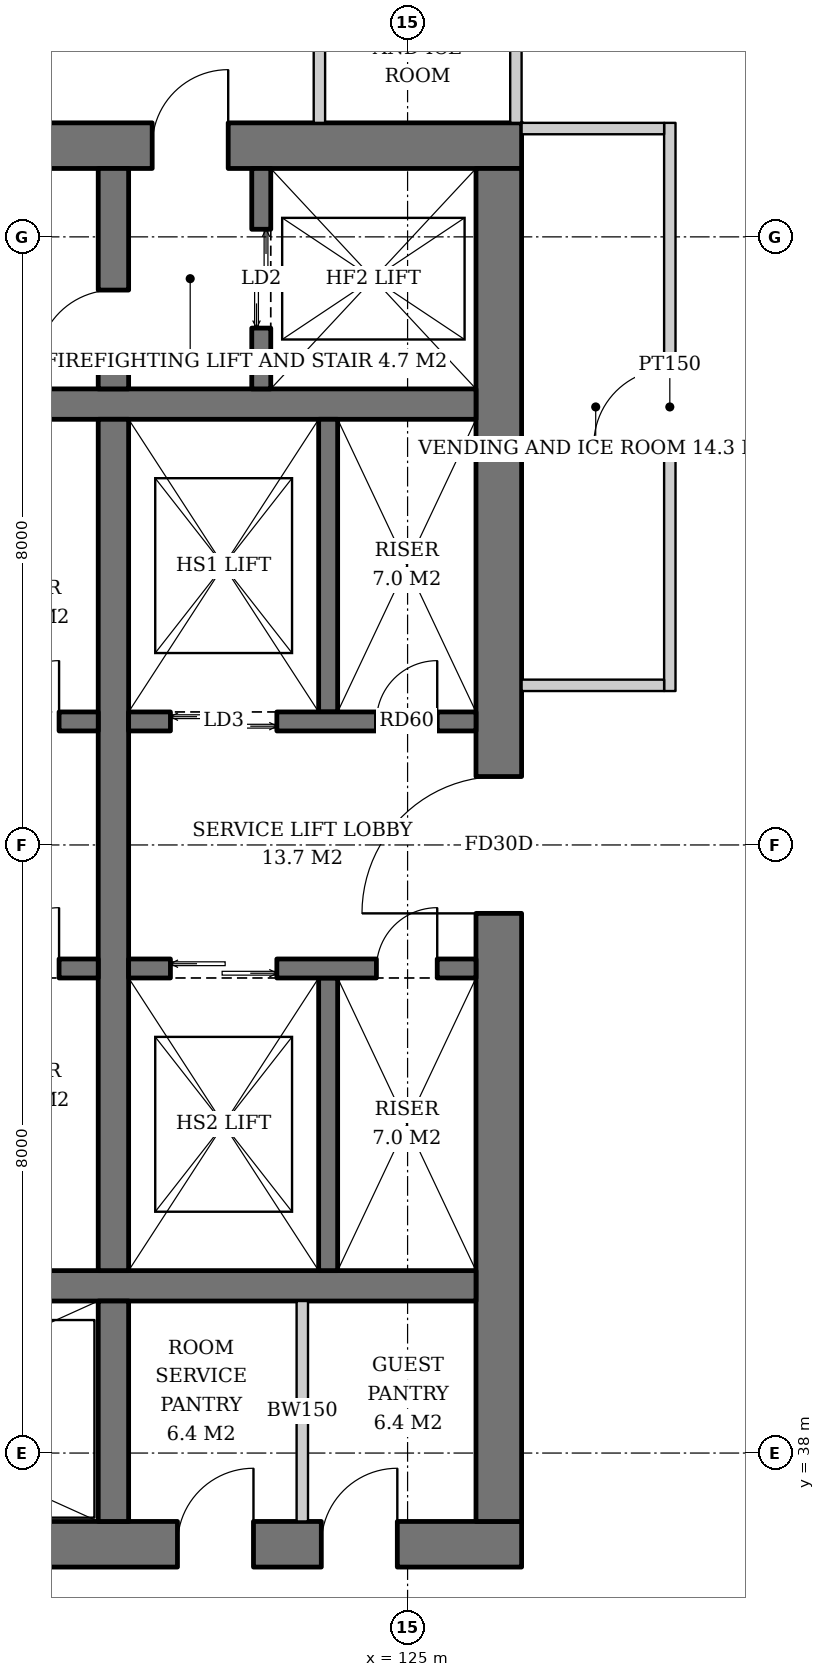
"""IFC4 building model, lengths in metres.
Left out: names, types, materials, properties, quantities, classifications, styles, units other than length and angle.
Written with IfcOpenShell. Run it as: python <this file> out.ifc"""

import sys

from ifc_helpers import new_model, si_unit, direction, frame, frame_2d, origin, place, context, subcontext, project, spatial, rectangle, extrude, element, fill, save


model = new_model("IFC4")
c1 = context("Model", 3, precision=1e-05, world=origin(), true_north=direction((0.0, 1.0)))
c2 = subcontext(c1, "Body", "Model", "MODEL_VIEW")
j1 = project(units=[si_unit("LENGTHUNIT", "METRE"), si_unit("PLANEANGLEUNIT", "RADIAN")], contexts=[c1])
p1 = place(None, origin())
s1 = spatial("IfcSite", under=j1, at=p1, CompositionType="ELEMENT")
p2 = place(p1, origin())
s2 = spatial("IfcBuilding", under=s1, at=p2, CompositionType="ELEMENT")
p3 = place(p2, frame((0.0, 0.0, 28.6)))
s3 = spatial("IfcBuildingStorey", under=s2, at=p3, CompositionType="ELEMENT", Elevation=28.6)
p4 = place(p3, frame((107.5, 36.8, 0.0), z_axis=(0.0, 0.0, 1.0), x_axis=(1.0, 0.0, 0.0)))
e1 = element("IfcWall", 1, at=p4, inside=s3, PredefinedType="SHEAR", context=c2, shape_type="SweptSolid", body=[
    extrude(rectangle(XDim=19.0, YDim=0.6, at=frame_2d((9.5, 0.0))), origin(), (0.0, 0.0, 1.0), 3.8),
])
p5 = place(p4, frame((3.9, 0.0, 0.0)))
e2 = element("IfcOpeningElement", 2, at=p5, cuts=e1, PredefinedType="OPENING", context=c2, shape_type="SweptSolid", body=[
    extrude(rectangle(XDim=1.0, YDim=2.1, at=frame_2d((0.5, 1.05))), frame((0.0, 0.31, 0.0), z_axis=(0.0, -1.0, 0.0), x_axis=(1.0, 0.0, 0.0)), (0.0, 0.0, 1.0), 0.62),
])
p6 = place(p4, frame((14.472, 0.0, 0.0)))
e3 = element("IfcOpeningElement", 3, at=p6, cuts=e1, PredefinedType="OPENING", context=c2, shape_type="SweptSolid", body=[
    extrude(rectangle(XDim=1.0, YDim=2.1, at=frame_2d((0.5, 1.05))), frame((0.0, 0.31, 0.0), z_axis=(0.0, -1.0, 0.0), x_axis=(1.0, 0.0, 0.0)), (0.0, 0.0, 1.0), 0.62),
])
p7 = place(p4, frame((16.365, 0.0, 0.0)))
e4 = element("IfcOpeningElement", 4, at=p7, cuts=e1, PredefinedType="OPENING", context=c2, shape_type="SweptSolid", body=[
    extrude(rectangle(XDim=1.0, YDim=2.1, at=frame_2d((0.5, 1.05))), frame((0.0, 0.31, 0.0), z_axis=(0.0, -1.0, 0.0), x_axis=(1.0, 0.0, 0.0)), (0.0, 0.0, 1.0), 0.62),
])
p8 = place(p3, frame((107.5, 55.2, 0.0), z_axis=(0.0, 0.0, 1.0), x_axis=(1.0, 0.0, 0.0)))
e5 = element("IfcWall", 5, at=p8, inside=s3, PredefinedType="SHEAR", context=c2, shape_type="SweptSolid", body=[
    extrude(rectangle(XDim=19.0, YDim=0.6, at=frame_2d((9.5, 0.0))), origin(), (0.0, 0.0, 1.0), 3.8),
])
p9 = place(p8, frame((14.14, 0.0, 0.0)))
e6 = element("IfcOpeningElement", 6, at=p9, cuts=e5, PredefinedType="OPENING", context=c2, shape_type="SweptSolid", body=[
    extrude(rectangle(XDim=1.0, YDim=2.1, at=frame_2d((0.5, 1.05))), frame((0.0, 0.31, 0.0), z_axis=(0.0, -1.0, 0.0), x_axis=(1.0, 0.0, 0.0)), (0.0, 0.0, 1.0), 0.62),
])
p10 = place(p8, frame((2.425, 0.0, 0.0)))
e7 = element("IfcOpeningElement", 7, at=p10, cuts=e5, PredefinedType="OPENING", context=c2, shape_type="SweptSolid", body=[
    extrude(rectangle(XDim=1.0, YDim=2.1, at=frame_2d((0.5, 1.05))), frame((0.0, 0.31, 0.0), z_axis=(0.0, -1.0, 0.0), x_axis=(1.0, 0.0, 0.0)), (0.0, 0.0, 1.0), 0.62),
])
p11 = place(p3, frame((126.2, 37.1, 0.0), z_axis=(0.0, 0.0, 1.0), x_axis=(0.0, 1.0, 0.0)))
e8 = element("IfcWall", 8, at=p11, inside=s3, PredefinedType="SHEAR", context=c2, shape_type="SweptSolid", body=[
    extrude(rectangle(XDim=17.8, YDim=0.6, at=frame_2d((8.9, 0.0))), origin(), (0.0, 0.0, 1.0), 3.8),
])
p12 = place(p11, frame((8.0, 0.0, 0.0)))
e9 = element("IfcOpeningElement", 9, at=p12, cuts=e8, PredefinedType="OPENING", context=c2, shape_type="SweptSolid", body=[
    extrude(rectangle(XDim=1.8, YDim=2.4, at=frame_2d((0.9, 1.2))), frame((0.0, 0.31, 0.0), z_axis=(0.0, -1.0, 0.0), x_axis=(1.0, 0.0, 0.0)), (0.0, 0.0, 1.0), 0.62),
])
for number, where, z_axis, x_axis in (
    (10, (108.1, 40.2, 0.0), (0.0, 0.0, 1.0), (1.0, 0.0, 0.0)),
    (11, (108.1, 51.8, 0.0), (0.0, 0.0, 1.0), (1.0, 0.0, 0.0)),
):
    element("IfcWall", number, at=place(p3, frame(where, z_axis=z_axis, x_axis=x_axis)), inside=s3, PredefinedType="SHEAR", context=c2, shape_type="SweptSolid", body=[
        extrude(rectangle(XDim=17.8, YDim=0.4, at=frame_2d((8.9, 0.0))), origin(), (0.0, 0.0, 1.0), 3.8),
    ])
p13 = place(p3, frame((121.13, 37.1, 0.0), z_axis=(0.0, 0.0, 1.0), x_axis=(0.0, 1.0, 0.0)))
e12 = element("IfcWall", 12, at=p13, inside=s3, PredefinedType="SHEAR", context=c2, shape_type="SweptSolid", body=[
    extrude(rectangle(XDim=2.9, YDim=0.4, at=frame_2d((1.45, 0.0))), origin(), (0.0, 0.0, 1.0), 3.8),
])
p14 = place(p3, frame((121.13, 40.4, 0.0), z_axis=(0.0, 0.0, 1.0), x_axis=(0.0, 1.0, 0.0)))
e13 = element("IfcWall", 13, at=p14, inside=s3, PredefinedType="SHEAR", context=c2, shape_type="SweptSolid", body=[
    extrude(rectangle(XDim=11.2, YDim=0.4, at=frame_2d((5.6, 0.0))), origin(), (0.0, 0.0, 1.0), 3.8),
])
p15 = place(p3, frame((121.13, 52.0, 0.0), z_axis=(0.0, 0.0, 1.0), x_axis=(0.0, 1.0, 0.0)))
e14 = element("IfcWall", 14, at=p15, inside=s3, PredefinedType="SHEAR", context=c2, shape_type="SweptSolid", body=[
    extrude(rectangle(XDim=2.9, YDim=0.4, at=frame_2d((1.45, 0.0))), origin(), (0.0, 0.0, 1.0), 3.8),
])
p16 = place(p15, frame((0.3, 0.0, 0.0)))
e15 = element("IfcOpeningElement", 15, at=p16, cuts=e14, PredefinedType="OPENING", context=c2, shape_type="SweptSolid", body=[
    extrude(rectangle(XDim=1.0, YDim=2.1, at=frame_2d((0.5, 1.05))), frame((0.0, 0.21, 0.0), z_axis=(0.0, -1.0, 0.0), x_axis=(1.0, 0.0, 0.0)), (0.0, 0.0, 1.0), 0.42),
])
p17 = place(p3, frame((123.075, 52.0, 0.0), z_axis=(0.0, 0.0, 1.0), x_axis=(0.0, 1.0, 0.0)))
e16 = element("IfcWall", 16, at=p17, inside=s3, PredefinedType="SHEAR", context=c2, shape_type="SweptSolid", body=[
    extrude(rectangle(XDim=2.9, YDim=0.25, at=frame_2d((1.45, 0.0))), origin(), (0.0, 0.0, 1.0), 3.8),
])
p18 = place(p17, frame((0.8, 0.0, 0.0)))
e17 = element("IfcOpeningElement", 17, at=p18, cuts=e16, PredefinedType="OPENING", context=c2, shape_type="SweptSolid", body=[
    extrude(rectangle(XDim=1.3, YDim=2.2, at=frame_2d((0.65, 1.1))), frame((0.0, 0.135, 0.0), z_axis=(0.0, -1.0, 0.0), x_axis=(1.0, 0.0, 0.0)), (0.0, 0.0, 1.0), 0.27),
])
p19 = place(p3, frame((108.1, 47.625, 0.0), z_axis=(0.0, 0.0, 1.0), x_axis=(1.0, 0.0, 0.0)))
e18 = element("IfcWall", 18, at=p19, inside=s3, PredefinedType="SHEAR", context=c2, shape_type="SweptSolid", body=[
    extrude(rectangle(XDim=12.83, YDim=0.25, at=frame_2d((6.415, 0.0))), origin(), (0.0, 0.0, 1.0), 3.8),
])
p20 = place(p19, frame((0.7, 0.0, 0.0)))
e19 = element("IfcOpeningElement", 19, at=p20, cuts=e18, PredefinedType="OPENING", context=c2, shape_type="SweptSolid", body=[
    extrude(rectangle(XDim=1.1, YDim=2.2, at=frame_2d((0.55, 1.1))), frame((0.0, 0.135, 0.0), z_axis=(0.0, -1.0, 0.0), x_axis=(1.0, 0.0, 0.0)), (0.0, 0.0, 1.0), 0.27),
])
p21 = place(p19, frame((3.45, 0.0, 0.0)))
e20 = element("IfcOpeningElement", 20, at=p21, cuts=e18, PredefinedType="OPENING", context=c2, shape_type="SweptSolid", body=[
    extrude(rectangle(XDim=1.1, YDim=2.2, at=frame_2d((0.55, 1.1))), frame((0.0, 0.135, 0.0), z_axis=(0.0, -1.0, 0.0), x_axis=(1.0, 0.0, 0.0)), (0.0, 0.0, 1.0), 0.27),
])
p22 = place(p19, frame((6.2, 0.0, 0.0)))
e21 = element("IfcOpeningElement", 21, at=p22, cuts=e18, PredefinedType="OPENING", context=c2, shape_type="SweptSolid", body=[
    extrude(rectangle(XDim=1.1, YDim=2.2, at=frame_2d((0.55, 1.1))), frame((0.0, 0.135, 0.0), z_axis=(0.0, -1.0, 0.0), x_axis=(1.0, 0.0, 0.0)), (0.0, 0.0, 1.0), 0.27),
])
p23 = place(p19, frame((8.95, 0.0, 0.0)))
e22 = element("IfcOpeningElement", 22, at=p23, cuts=e18, PredefinedType="OPENING", context=c2, shape_type="SweptSolid", body=[
    extrude(rectangle(XDim=1.1, YDim=2.2, at=frame_2d((0.55, 1.1))), frame((0.0, 0.135, 0.0), z_axis=(0.0, -1.0, 0.0), x_axis=(1.0, 0.0, 0.0)), (0.0, 0.0, 1.0), 0.27),
])
p24 = place(p19, frame((11.515, 0.0, 0.0)))
e23 = element("IfcOpeningElement", 23, at=p24, cuts=e18, PredefinedType="OPENING", context=c2, shape_type="SweptSolid", body=[
    extrude(rectangle(XDim=0.8, YDim=2.0, at=frame_2d((0.4, 1.0))), frame((0.0, 0.135, 0.0), z_axis=(0.0, -1.0, 0.0), x_axis=(1.0, 0.0, 0.0)), (0.0, 0.0, 1.0), 0.27),
])
p25 = place(p3, frame((108.1, 44.375, 0.0), z_axis=(0.0, 0.0, 1.0), x_axis=(1.0, 0.0, 0.0)))
e24 = element("IfcWall", 24, at=p25, inside=s3, PredefinedType="SHEAR", context=c2, shape_type="SweptSolid", body=[
    extrude(rectangle(XDim=12.83, YDim=0.25, at=frame_2d((6.415, 0.0))), origin(), (0.0, 0.0, 1.0), 3.8),
])
p26 = place(p25, frame((0.7, 0.0, 0.0)))
e25 = element("IfcOpeningElement", 25, at=p26, cuts=e24, PredefinedType="OPENING", context=c2, shape_type="SweptSolid", body=[
    extrude(rectangle(XDim=1.1, YDim=2.2, at=frame_2d((0.55, 1.1))), frame((0.0, 0.135, 0.0), z_axis=(0.0, -1.0, 0.0), x_axis=(1.0, 0.0, 0.0)), (0.0, 0.0, 1.0), 0.27),
])
p27 = place(p25, frame((3.45, 0.0, 0.0)))
e26 = element("IfcOpeningElement", 26, at=p27, cuts=e24, PredefinedType="OPENING", context=c2, shape_type="SweptSolid", body=[
    extrude(rectangle(XDim=1.1, YDim=2.2, at=frame_2d((0.55, 1.1))), frame((0.0, 0.135, 0.0), z_axis=(0.0, -1.0, 0.0), x_axis=(1.0, 0.0, 0.0)), (0.0, 0.0, 1.0), 0.27),
])
p28 = place(p25, frame((6.2, 0.0, 0.0)))
e27 = element("IfcOpeningElement", 27, at=p28, cuts=e24, PredefinedType="OPENING", context=c2, shape_type="SweptSolid", body=[
    extrude(rectangle(XDim=1.1, YDim=2.2, at=frame_2d((0.55, 1.1))), frame((0.0, 0.135, 0.0), z_axis=(0.0, -1.0, 0.0), x_axis=(1.0, 0.0, 0.0)), (0.0, 0.0, 1.0), 0.27),
])
p29 = place(p25, frame((9.0, 0.0, 0.0)))
e28 = element("IfcOpeningElement", 28, at=p29, cuts=e24, PredefinedType="OPENING", context=c2, shape_type="SweptSolid", body=[
    extrude(rectangle(XDim=1.0, YDim=2.1, at=frame_2d((0.5, 1.05))), frame((0.0, 0.135, 0.0), z_axis=(0.0, -1.0, 0.0), x_axis=(1.0, 0.0, 0.0)), (0.0, 0.0, 1.0), 0.27),
])
p30 = place(p25, frame((11.515, 0.0, 0.0)))
e29 = element("IfcOpeningElement", 29, at=p30, cuts=e24, PredefinedType="OPENING", context=c2, shape_type="SweptSolid", body=[
    extrude(rectangle(XDim=0.8, YDim=2.0, at=frame_2d((0.4, 1.0))), frame((0.0, 0.135, 0.0), z_axis=(0.0, -1.0, 0.0), x_axis=(1.0, 0.0, 0.0)), (0.0, 0.0, 1.0), 0.27),
])
p31 = place(p3, frame((123.955, 47.75, 0.0), z_axis=(0.0, 0.0, 1.0), x_axis=(0.0, 1.0, 0.0)))
e30 = element("IfcWall", 30, at=p31, inside=s3, PredefinedType="SHEAR", context=c2, shape_type="SweptSolid", body=[
    extrude(rectangle(XDim=3.85, YDim=0.25, at=frame_2d((1.925, 0.0))), origin(), (0.0, 0.0, 1.0), 3.8),
])
p32 = place(p3, frame((121.33, 47.625, 0.0), z_axis=(0.0, 0.0, 1.0), x_axis=(1.0, 0.0, 0.0)))
e31 = element("IfcWall", 31, at=p32, inside=s3, PredefinedType="SHEAR", context=c2, shape_type="SweptSolid", body=[
    extrude(rectangle(XDim=4.57, YDim=0.25, at=frame_2d((2.285, 0.0))), origin(), (0.0, 0.0, 1.0), 3.8),
])
p33 = place(p32, frame((0.55, 0.0, 0.0)))
e32 = element("IfcOpeningElement", 32, at=p33, cuts=e31, PredefinedType="OPENING", context=c2, shape_type="SweptSolid", body=[
    extrude(rectangle(XDim=1.4, YDim=2.4, at=frame_2d((0.7, 1.2))), frame((0.0, 0.135, 0.0), z_axis=(0.0, -1.0, 0.0), x_axis=(1.0, 0.0, 0.0)), (0.0, 0.0, 1.0), 0.27),
])
p34 = place(p32, frame((3.26, 0.0, 0.0)))
e33 = element("IfcOpeningElement", 33, at=p34, cuts=e31, PredefinedType="OPENING", context=c2, shape_type="SweptSolid", body=[
    extrude(rectangle(XDim=0.8, YDim=2.0, at=frame_2d((0.4, 1.0))), frame((0.0, 0.135, 0.0), z_axis=(0.0, -1.0, 0.0), x_axis=(1.0, 0.0, 0.0)), (0.0, 0.0, 1.0), 0.27),
])
p35 = place(p3, frame((123.955, 44.25, 0.0), z_axis=(0.0, 0.0, 1.0), x_axis=(0.0, -1.0, 0.0)))
e34 = element("IfcWall", 34, at=p35, inside=s3, PredefinedType="SHEAR", context=c2, shape_type="SweptSolid", body=[
    extrude(rectangle(XDim=3.85, YDim=0.25, at=frame_2d((1.925, 0.0))), origin(), (0.0, 0.0, 1.0), 3.8),
])
p36 = place(p3, frame((121.33, 44.375, 0.0), z_axis=(0.0, 0.0, 1.0), x_axis=(1.0, 0.0, 0.0)))
e35 = element("IfcWall", 35, at=p36, inside=s3, PredefinedType="SHEAR", context=c2, shape_type="SweptSolid", body=[
    extrude(rectangle(XDim=4.57, YDim=0.25, at=frame_2d((2.285, 0.0))), origin(), (0.0, 0.0, 1.0), 3.8),
])
p37 = place(p36, frame((0.55, 0.0, 0.0)))
e36 = element("IfcOpeningElement", 36, at=p37, cuts=e35, PredefinedType="OPENING", context=c2, shape_type="SweptSolid", body=[
    extrude(rectangle(XDim=1.4, YDim=2.4, at=frame_2d((0.7, 1.2))), frame((0.0, 0.135, 0.0), z_axis=(0.0, -1.0, 0.0), x_axis=(1.0, 0.0, 0.0)), (0.0, 0.0, 1.0), 0.27),
])
p38 = place(p36, frame((3.26, 0.0, 0.0)))
e37 = element("IfcOpeningElement", 37, at=p38, cuts=e35, PredefinedType="OPENING", context=c2, shape_type="SweptSolid", body=[
    extrude(rectangle(XDim=0.8, YDim=2.0, at=frame_2d((0.4, 1.0))), frame((0.0, 0.135, 0.0), z_axis=(0.0, -1.0, 0.0), x_axis=(1.0, 0.0, 0.0)), (0.0, 0.0, 1.0), 0.27),
])
p39 = place(p3, frame((123.615, 37.1, 0.0), z_axis=(0.0, 0.0, 1.0), x_axis=(0.0, 1.0, 0.0)))
e38 = element("IfcWall", 38, at=p39, inside=s3, PredefinedType="SOLIDWALL", context=c2, shape_type="SweptSolid", body=[
    extrude(rectangle(XDim=2.9, YDim=0.15, at=frame_2d((1.45, 0.0))), origin(), (0.0, 0.0, 1.0), 3.6),
])
p40 = place(p3, frame((128.45, 48.025, 0.0), z_axis=(0.0, 0.0, 1.0), x_axis=(0.0, 1.0, 0.0)))
e39 = element("IfcWall", 39, at=p40, inside=s3, PredefinedType="PARTITIONING", context=c2, shape_type="SweptSolid", body=[
    extrude(rectangle(XDim=7.475, YDim=0.15, at=frame_2d((3.738, 0.0))), origin(), (0.0, 0.0, 1.0), 2.847),
])
p41 = place(p40, frame((3.238, 0.0, 0.0)))
e40 = element("IfcOpeningElement", 40, at=p41, cuts=e39, PredefinedType="OPENING", context=c2, shape_type="SweptSolid", body=[
    extrude(rectangle(XDim=1.0, YDim=2.1, at=frame_2d((0.5, 1.05))), frame((0.0, 0.085, 0.0), z_axis=(0.0, -1.0, 0.0), x_axis=(1.0, 0.0, 0.0)), (0.0, 0.0, 1.0), 0.17),
])
for number, where, z_axis, x_axis in (
    (41, (126.5, 48.1, 0.0), (0.0, 0.0, 1.0), (1.0, 0.0, 0.0)),
    (42, (126.5, 55.425, 0.0), (0.0, 0.0, 1.0), (1.0, 0.0, 0.0)),
):
    element("IfcWall", number, at=place(p3, frame(where, z_axis=z_axis, x_axis=x_axis)), inside=s3, PredefinedType="PARTITIONING", context=c2, shape_type="SweptSolid", body=[
        extrude(rectangle(XDim=1.875, YDim=0.15, at=frame_2d((0.938, 0.0))), origin(), (0.0, 0.0, 1.0), 3.6),
    ])
p42 = place(p3, frame((126.425, 55.5, 0.0), z_axis=(0.0, 0.0, 1.0), x_axis=(0.0, 1.0, 0.0)))
e43 = element("IfcWall", 43, at=p42, inside=s3, PredefinedType="PARTITIONING", context=c2, shape_type="SweptSolid", body=[
    extrude(rectangle(XDim=1.875, YDim=0.15, at=frame_2d((0.938, 0.0))), origin(), (0.0, 0.0, 1.0), 2.8),
])
p43 = place(p3, frame((123.84, 55.5, 0.0), z_axis=(0.0, 0.0, 1.0), x_axis=(0.0, 1.0, 0.0)))
e44 = element("IfcWall", 44, at=p43, inside=s3, PredefinedType="PARTITIONING", context=c2, shape_type="SweptSolid", body=[
    extrude(rectangle(XDim=1.875, YDim=0.15, at=frame_2d((0.938, 0.0))), origin(), (0.0, 0.0, 1.0), 3.6),
])
p44 = place(p18, origin())
e45 = element("IfcDoor", 45, at=p44, inside=s3, OperationType="DOUBLE_DOOR_SLIDING", PredefinedType="DOOR", context=c2, shape_type="SweptSolid", body=[
    extrude(rectangle(XDim=1.3, YDim=2.2, at=frame_2d((0.65, 1.1))), frame((0.0, 0.025, 0.0), z_axis=(0.0, -1.0, 0.0), x_axis=(1.0, 0.0, 0.0)), (0.0, 0.0, 1.0), 0.05),
])
fill(e17, e45)
p45 = place(p24, origin())
e46 = element("IfcDoor", 46, at=p45, inside=s3, OperationType="SINGLE_SWING_RIGHT", PredefinedType="DOOR", context=c2, shape_type="SweptSolid", body=[
    extrude(rectangle(XDim=0.8, YDim=2.0, at=frame_2d((0.4, 1.0))), frame((0.0, 0.025, 0.0), z_axis=(0.0, -1.0, 0.0), x_axis=(1.0, 0.0, 0.0)), (0.0, 0.0, 1.0), 0.05),
])
fill(e23, e46)
p46 = place(p30, origin())
e47 = element("IfcDoor", 47, at=p46, inside=s3, OperationType="SINGLE_SWING_RIGHT", PredefinedType="DOOR", context=c2, shape_type="SweptSolid", body=[
    extrude(rectangle(XDim=0.8, YDim=2.0, at=frame_2d((0.4, 1.0))), frame((0.0, 0.025, 0.0), z_axis=(0.0, -1.0, 0.0), x_axis=(1.0, 0.0, 0.0)), (0.0, 0.0, 1.0), 0.05),
])
fill(e29, e47)
p47 = place(p33, origin())
e48 = element("IfcDoor", 48, at=p47, inside=s3, OperationType="DOUBLE_DOOR_SLIDING", PredefinedType="DOOR", context=c2, shape_type="SweptSolid", body=[
    extrude(rectangle(XDim=1.4, YDim=2.4, at=frame_2d((0.7, 1.2))), frame((0.0, 0.025, 0.0), z_axis=(0.0, -1.0, 0.0), x_axis=(1.0, 0.0, 0.0)), (0.0, 0.0, 1.0), 0.05),
])
fill(e32, e48)
p48 = place(p34, origin())
e49 = element("IfcDoor", 49, at=p48, inside=s3, OperationType="SINGLE_SWING_RIGHT", PredefinedType="DOOR", context=c2, shape_type="SweptSolid", body=[
    extrude(rectangle(XDim=0.8, YDim=2.0, at=frame_2d((0.4, 1.0))), frame((0.0, 0.025, 0.0), z_axis=(0.0, -1.0, 0.0), x_axis=(1.0, 0.0, 0.0)), (0.0, 0.0, 1.0), 0.05),
])
fill(e33, e49)
p49 = place(p37, origin())
e50 = element("IfcDoor", 50, at=p49, inside=s3, OperationType="DOUBLE_DOOR_SLIDING", PredefinedType="DOOR", context=c2, shape_type="SweptSolid", body=[
    extrude(rectangle(XDim=1.4, YDim=2.4, at=frame_2d((0.7, 1.2))), frame((0.0, 0.025, 0.0), z_axis=(0.0, -1.0, 0.0), x_axis=(1.0, 0.0, 0.0)), (0.0, 0.0, 1.0), 0.05),
])
fill(e36, e50)
p50 = place(p38, origin())
e51 = element("IfcDoor", 51, at=p50, inside=s3, OperationType="SINGLE_SWING_RIGHT", PredefinedType="DOOR", context=c2, shape_type="SweptSolid", body=[
    extrude(rectangle(XDim=0.8, YDim=2.0, at=frame_2d((0.4, 1.0))), frame((0.0, 0.025, 0.0), z_axis=(0.0, -1.0, 0.0), x_axis=(1.0, 0.0, 0.0)), (0.0, 0.0, 1.0), 0.05),
])
fill(e37, e51)
p51 = place(p16, origin())
e52 = element("IfcDoor", 52, at=p51, inside=s3, OperationType="SINGLE_SWING_LEFT", PredefinedType="DOOR", context=c2, shape_type="SweptSolid", body=[
    extrude(rectangle(XDim=1.0, YDim=2.1, at=frame_2d((0.5, 1.05))), frame((0.0, 0.025, 0.0), z_axis=(0.0, -1.0, 0.0), x_axis=(1.0, 0.0, 0.0)), (0.0, 0.0, 1.0), 0.05),
])
fill(e15, e52)
p52 = place(p9, origin())
e53 = element("IfcDoor", 53, at=p52, inside=s3, OperationType="SINGLE_SWING_RIGHT", PredefinedType="DOOR", context=c2, shape_type="SweptSolid", body=[
    extrude(rectangle(XDim=1.0, YDim=2.1, at=frame_2d((0.5, 1.05))), frame((0.0, 0.025, 0.0), z_axis=(0.0, -1.0, 0.0), x_axis=(1.0, 0.0, 0.0)), (0.0, 0.0, 1.0), 0.05),
])
fill(e6, e53)
p53 = place(p12, origin())
e54 = element("IfcDoor", 54, at=p53, inside=s3, OperationType="DOUBLE_DOOR_SINGLE_SWING", PredefinedType="DOOR", context=c2, shape_type="SweptSolid", body=[
    extrude(rectangle(XDim=1.8, YDim=2.4, at=frame_2d((0.9, 1.2))), frame((0.0, 0.025, 0.0), z_axis=(0.0, -1.0, 0.0), x_axis=(1.0, 0.0, 0.0)), (0.0, 0.0, 1.0), 0.05),
])
fill(e9, e54)
p54 = place(p6, origin())
e55 = element("IfcDoor", 55, at=p54, inside=s3, OperationType="SINGLE_SWING_RIGHT", PredefinedType="DOOR", context=c2, shape_type="SweptSolid", body=[
    extrude(rectangle(XDim=1.0, YDim=2.1, at=frame_2d((0.5, 1.05))), frame((0.0, 0.29, 0.0), z_axis=(0.0, -1.0, 0.0), x_axis=(1.0, 0.0, 0.0)), (0.0, 0.0, 1.0), 0.05),
])
fill(e3, e55)
p55 = place(p7, origin())
e56 = element("IfcDoor", 56, at=p55, inside=s3, OperationType="SINGLE_SWING_RIGHT", PredefinedType="DOOR", context=c2, shape_type="SweptSolid", body=[
    extrude(rectangle(XDim=1.0, YDim=2.1, at=frame_2d((0.5, 1.05))), frame((0.0, 0.29, 0.0), z_axis=(0.0, -1.0, 0.0), x_axis=(1.0, 0.0, 0.0)), (0.0, 0.0, 1.0), 0.05),
])
fill(e4, e56)
p56 = place(p41, origin())
e57 = element("IfcDoor", 57, at=p56, inside=s3, OperationType="SINGLE_SWING_LEFT", PredefinedType="DOOR", context=c2, shape_type="SweptSolid", body=[
    extrude(rectangle(XDim=1.0, YDim=2.1, at=frame_2d((0.5, 1.05))), frame((0.0, 0.025, 0.0), z_axis=(0.0, -1.0, 0.0), x_axis=(1.0, 0.0, 0.0)), (0.0, 0.0, 1.0), 0.05),
])
fill(e40, e57)
save(model, sys.argv[1])
